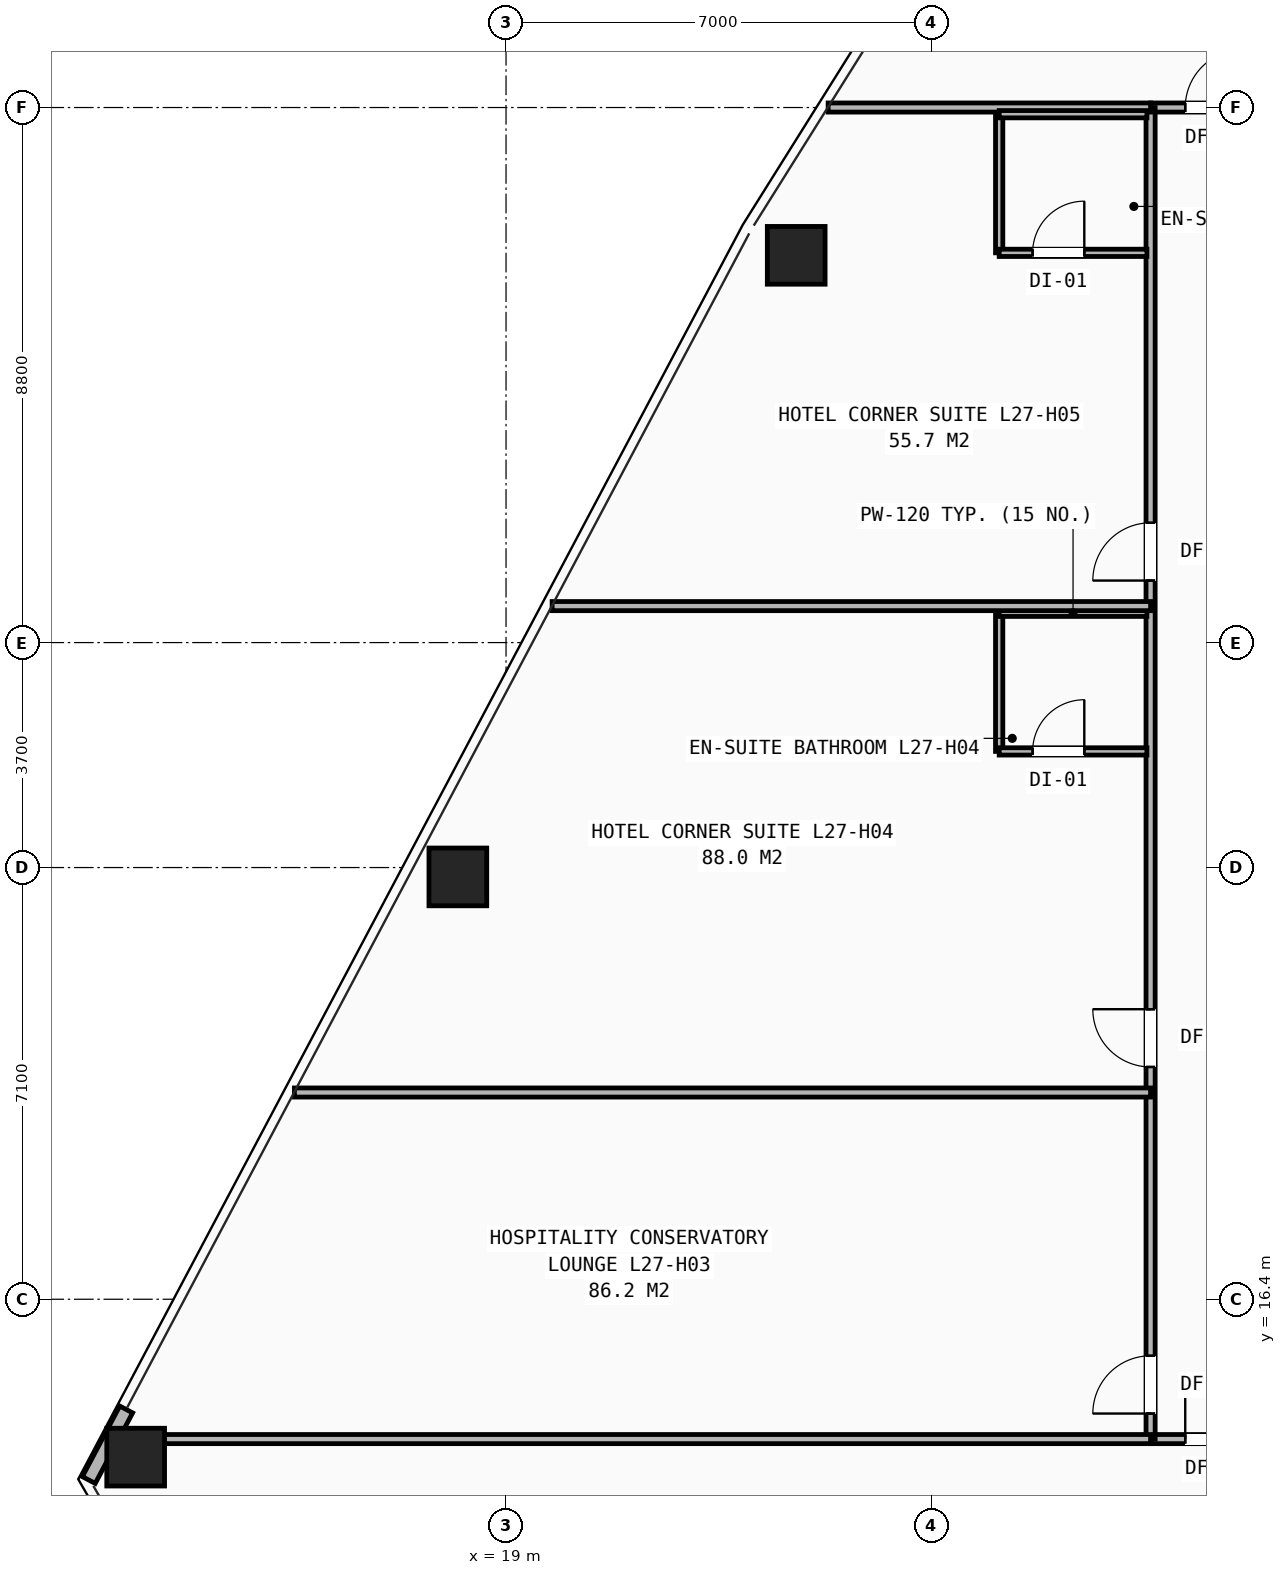
"""IFC4 building model, lengths in metres.
Left out: names, types, materials, properties, quantities, classifications, styles, units other than length and angle.
Written with IfcOpenShell. Run it as: python <this file> out.ifc"""

import sys

from ifc_helpers import new_model, si_unit, direction, frame, frame_2d, origin, origin_2d, place, context, subcontext, project, spatial, rectangle, hollow_rectangle, extrude, element, fill, save


model = new_model("IFC4")
c1 = context("Model", 3, precision=1e-05, world=origin(), true_north=direction((0.0, 1.0)))
c2 = subcontext(c1, "Body", "Model", "MODEL_VIEW")
j1 = project(units=[si_unit("LENGTHUNIT", "METRE"), si_unit("PLANEANGLEUNIT", "RADIAN")], contexts=[c1])
p1 = place(None, origin())
s1 = spatial("IfcSite", under=j1, at=p1, CompositionType="ELEMENT")
p2 = place(p1, origin())
s2 = spatial("IfcBuilding", under=s1, at=p2, CompositionType="ELEMENT")
p3 = place(p2, frame((0.0, 0.0, 95.8)))
s3 = spatial("IfcBuildingStorey", under=s2, at=p3, CompositionType="ELEMENT", Elevation=95.8)
for number, where, z_axis, x_axis in (
    (1, (23.772, 33.569, 0.0), (0.0, 0.0, 1.0), (1.0, 0.0, 0.0)),
    (2, (18.208, 23.346, 0.0), (0.0, 0.0, 1.0), (1.0, 0.0, 0.0)),
    (3, (12.909, 13.803, 0.0), (0.0, 0.0, 1.0), (1.0, 0.0, 0.0)),
):
    element("IfcColumn", number, at=place(p3, frame(where, z_axis=z_axis, x_axis=x_axis)), inside=s3, PredefinedType="COLUMN", context=c2, shape_type="SweptSolid", body=[
        extrude(hollow_rectangle(XDim=0.95, YDim=0.95, WallThickness=0.065, at=origin_2d()), origin(), (0.0, 0.0, 1.0), 3.2),
    ])
p4 = place(p3, frame((12.753, 14.587, 0.0), z_axis=(0.0, 0.0, 1.0), x_axis=(-0.468058524958, -0.883697469281, 0.0)))
e4 = element("IfcWall", 4, at=p4, inside=s3, PredefinedType="SHEAR", context=c2, shape_type="SweptSolid", body=[
    extrude(rectangle(XDim=1.313, YDim=0.24, at=frame_2d((0.657, 0.0))), origin(), (0.0, 0.0, 1.0), 2.253),
])
p5 = place(p3, frame((29.6, 14.1, 0.0), z_axis=(0.0, 0.0, 1.0), x_axis=(1.0, 0.0, 0.0)))
e5 = element("IfcWall", 5, at=p5, inside=s3, PredefinedType="PARTITIONING", context=c2, shape_type="SweptSolid", body=[
    extrude(rectangle(XDim=20.8, YDim=0.15, at=frame_2d((10.4, 0.0))), origin(), (0.0, 0.0, 1.0), 2.421),
])
p6 = place(p5, frame((0.57, 0.0, 0.0)))
e6 = element("IfcOpeningElement", 6, at=p6, cuts=e5, PredefinedType="OPENING", context=c2, shape_type="SweptSolid", body=[
    extrude(rectangle(XDim=0.95, YDim=2.1, at=frame_2d((0.475, 1.05))), frame((0.0, 0.085, 0.0), z_axis=(0.0, -1.0, 0.0), x_axis=(1.0, 0.0, 0.0)), (0.0, 0.0, 1.0), 0.17),
])
p7 = place(p5, frame((14.02, 0.0, 0.0)))
e7 = element("IfcOpeningElement", 7, at=p7, cuts=e5, PredefinedType="OPENING", context=c2, shape_type="SweptSolid", body=[
    extrude(rectangle(XDim=0.95, YDim=2.1, at=frame_2d((0.475, 1.05))), frame((0.0, 0.085, 0.0), z_axis=(0.0, -1.0, 0.0), x_axis=(1.0, 0.0, 0.0)), (0.0, 0.0, 1.0), 0.17),
])
p8 = place(p3, frame((29.6, 36.0, 0.0), z_axis=(0.0, 0.0, 1.0), x_axis=(1.0, 0.0, 0.0)))
e8 = element("IfcWall", 8, at=p8, inside=s3, PredefinedType="PARTITIONING", context=c2, shape_type="SweptSolid", body=[
    extrude(rectangle(XDim=9.65, YDim=0.15, at=frame_2d((4.825, 0.0))), origin(), (0.0, 0.0, 1.0), 2.503),
])
p9 = place(p8, frame((0.57, 0.0, 0.0)))
e9 = element("IfcOpeningElement", 9, at=p9, cuts=e8, PredefinedType="OPENING", context=c2, shape_type="SweptSolid", body=[
    extrude(rectangle(XDim=0.95, YDim=2.1, at=frame_2d((0.475, 1.05))), frame((0.0, 0.085, 0.0), z_axis=(0.0, -1.0, 0.0), x_axis=(1.0, 0.0, 0.0)), (0.0, 0.0, 1.0), 0.17),
])
p10 = place(p8, frame((8.02, 0.0, 0.0)))
e10 = element("IfcOpeningElement", 10, at=p10, cuts=e8, PredefinedType="OPENING", context=c2, shape_type="SweptSolid", body=[
    extrude(rectangle(XDim=0.95, YDim=2.1, at=frame_2d((0.475, 1.05))), frame((0.0, 0.085, 0.0), z_axis=(0.0, -1.0, 0.0), x_axis=(1.0, 0.0, 0.0)), (0.0, 0.0, 1.0), 0.17),
])
p11 = place(p3, frame((29.6, 14.1, 0.0), z_axis=(0.0, 0.0, 1.0), x_axis=(0.0, 1.0, 0.0)))
e11 = element("IfcWall", 11, at=p11, inside=s3, PredefinedType="PARTITIONING", context=c2, shape_type="SweptSolid", body=[
    extrude(rectangle(XDim=21.9, YDim=0.15, at=frame_2d((10.95, 0.0))), origin(), (0.0, 0.0, 1.0), 2.421),
])
p12 = place(p11, frame((0.42, 0.0, 0.0)))
e12 = element("IfcOpeningElement", 12, at=p12, cuts=e11, PredefinedType="OPENING", context=c2, shape_type="SweptSolid", body=[
    extrude(rectangle(XDim=0.95, YDim=2.1, at=frame_2d((0.475, 1.05))), frame((0.0, 0.085, 0.0), z_axis=(0.0, -1.0, 0.0), x_axis=(1.0, 0.0, 0.0)), (0.0, 0.0, 1.0), 0.17),
])
p13 = place(p11, frame((6.12, 0.0, 0.0)))
e13 = element("IfcOpeningElement", 13, at=p13, cuts=e11, PredefinedType="OPENING", context=c2, shape_type="SweptSolid", body=[
    extrude(rectangle(XDim=0.95, YDim=2.1, at=frame_2d((0.475, 1.05))), frame((0.0, 0.085, 0.0), z_axis=(0.0, -1.0, 0.0), x_axis=(1.0, 0.0, 0.0)), (0.0, 0.0, 1.0), 0.17),
])
p14 = place(p11, frame((14.12, 0.0, 0.0)))
e14 = element("IfcOpeningElement", 14, at=p14, cuts=e11, PredefinedType="OPENING", context=c2, shape_type="SweptSolid", body=[
    extrude(rectangle(XDim=0.95, YDim=2.1, at=frame_2d((0.475, 1.05))), frame((0.0, 0.085, 0.0), z_axis=(0.0, -1.0, 0.0), x_axis=(1.0, 0.0, 0.0)), (0.0, 0.0, 1.0), 0.17),
])
p15 = place(p3, frame((12.5, 14.1, 0.0), z_axis=(0.0, 0.0, 1.0), x_axis=(1.0, 0.0, 0.0)))
e15 = element("IfcWall", 15, at=p15, inside=s3, PredefinedType="PARTITIONING", context=c2, shape_type="SweptSolid", body=[
    extrude(rectangle(XDim=17.1, YDim=0.15, at=frame_2d((8.55, 0.0))), origin(), (0.0, 0.0, 1.0), 2.258),
])
p16 = place(p3, frame((24.297, 36.0, 0.0), z_axis=(0.0, 0.0, 1.0), x_axis=(1.0, 0.0, 0.0)))
e16 = element("IfcWall", 16, at=p16, inside=s3, PredefinedType="PARTITIONING", context=c2, shape_type="SweptSolid", body=[
    extrude(rectangle(XDim=5.303, YDim=0.15, at=frame_2d((2.651, 0.0))), origin(), (0.0, 0.0, 1.0), 2.258),
])
p17 = place(p3, frame((15.52, 19.8, 0.0), z_axis=(0.0, 0.0, 1.0), x_axis=(1.0, 0.0, 0.0)))
e17 = element("IfcWall", 17, at=p17, inside=s3, PredefinedType="PARTITIONING", context=c2, shape_type="SweptSolid", body=[
    extrude(rectangle(XDim=14.08, YDim=0.15, at=frame_2d((7.04, 0.0))), origin(), (0.0, 0.0, 1.0), 2.258),
])
p18 = place(p3, frame((27.11, 25.41, 0.0), z_axis=(0.0, 0.0, 1.0), x_axis=(0.0, 1.0, 0.0)))
e18 = element("IfcWall", 18, at=p18, inside=s3, PredefinedType="PARTITIONING", context=c2, shape_type="SweptSolid", body=[
    extrude(rectangle(XDim=2.28, YDim=0.12, at=frame_2d((1.14, 0.0))), origin(), (0.0, 0.0, 1.0), 2.97),
])
p19 = place(p3, frame((27.11, 25.41, 0.0), z_axis=(0.0, 0.0, 1.0), x_axis=(1.0, 0.0, 0.0)))
e19 = element("IfcWall", 19, at=p19, inside=s3, PredefinedType="PARTITIONING", context=c2, shape_type="SweptSolid", body=[
    extrude(rectangle(XDim=2.43, YDim=0.12, at=frame_2d((1.215, 0.0))), origin(), (0.0, 0.0, 1.0), 2.97),
])
p20 = place(p19, frame((0.55, 0.0, 0.0)))
e20 = element("IfcOpeningElement", 20, at=p20, cuts=e19, PredefinedType="OPENING", context=c2, shape_type="SweptSolid", body=[
    extrude(rectangle(XDim=0.85, YDim=2.05, at=frame_2d((0.425, 1.025))), frame((0.0, 0.07, 0.0), z_axis=(0.0, -1.0, 0.0), x_axis=(1.0, 0.0, 0.0)), (0.0, 0.0, 1.0), 0.14),
])
p21 = place(p3, frame((27.11, 27.69, 0.0), z_axis=(0.0, 0.0, 1.0), x_axis=(1.0, 0.0, 0.0)))
e21 = element("IfcWall", 21, at=p21, inside=s3, PredefinedType="PARTITIONING", context=c2, shape_type="SweptSolid", body=[
    extrude(rectangle(XDim=2.43, YDim=0.12, at=frame_2d((1.215, 0.0))), origin(), (0.0, 0.0, 1.0), 2.97),
])
p22 = place(p3, frame((19.758, 27.8, 0.0), z_axis=(0.0, 0.0, 1.0), x_axis=(1.0, 0.0, 0.0)))
e22 = element("IfcWall", 22, at=p22, inside=s3, PredefinedType="PARTITIONING", context=c2, shape_type="SweptSolid", body=[
    extrude(rectangle(XDim=9.842, YDim=0.15, at=frame_2d((4.921, 0.0))), origin(), (0.0, 0.0, 1.0), 2.258),
])
p23 = place(p3, frame((27.11, 33.61, 0.0), z_axis=(0.0, 0.0, 1.0), x_axis=(0.0, 1.0, 0.0)))
e23 = element("IfcWall", 23, at=p23, inside=s3, PredefinedType="PARTITIONING", context=c2, shape_type="SweptSolid", body=[
    extrude(rectangle(XDim=2.28, YDim=0.12, at=frame_2d((1.14, 0.0))), origin(), (0.0, 0.0, 1.0), 2.97),
])
p24 = place(p3, frame((27.11, 33.61, 0.0), z_axis=(0.0, 0.0, 1.0), x_axis=(1.0, 0.0, 0.0)))
e24 = element("IfcWall", 24, at=p24, inside=s3, PredefinedType="PARTITIONING", context=c2, shape_type="SweptSolid", body=[
    extrude(rectangle(XDim=2.43, YDim=0.12, at=frame_2d((1.215, 0.0))), origin(), (0.0, 0.0, 1.0), 2.503),
])
p25 = place(p24, frame((0.55, 0.0, 0.0)))
e25 = element("IfcOpeningElement", 25, at=p25, cuts=e24, PredefinedType="OPENING", context=c2, shape_type="SweptSolid", body=[
    extrude(rectangle(XDim=0.85, YDim=2.05, at=frame_2d((0.425, 1.025))), frame((0.0, 0.07, 0.0), z_axis=(0.0, -1.0, 0.0), x_axis=(1.0, 0.0, 0.0)), (0.0, 0.0, 1.0), 0.14),
])
p26 = place(p3, frame((27.11, 35.89, 0.0), z_axis=(0.0, 0.0, 1.0), x_axis=(1.0, 0.0, 0.0)))
e26 = element("IfcWall", 26, at=p26, inside=s3, PredefinedType="PARTITIONING", context=c2, shape_type="SweptSolid", body=[
    extrude(rectangle(XDim=2.43, YDim=0.12, at=frame_2d((1.215, 0.0))), origin(), (0.0, 0.0, 1.0), 2.503),
])
p27 = place(p6, origin())
e27 = element("IfcDoor", 27, at=p27, inside=s3, OperationType="SINGLE_SWING_LEFT", PredefinedType="DOOR", context=c2, shape_type="SweptSolid", body=[
    extrude(rectangle(XDim=0.95, YDim=2.1, at=frame_2d((0.475, 1.05))), frame((0.0, 0.025, 0.0), z_axis=(0.0, -1.0, 0.0), x_axis=(1.0, 0.0, 0.0)), (0.0, 0.0, 1.0), 0.05),
])
fill(e6, e27)
p28 = place(p12, origin())
e28 = element("IfcDoor", 28, at=p28, inside=s3, OperationType="SINGLE_SWING_LEFT", PredefinedType="DOOR", context=c2, shape_type="SweptSolid", body=[
    extrude(rectangle(XDim=0.95, YDim=2.1, at=frame_2d((0.475, 1.05))), frame((0.0, 0.025, 0.0), z_axis=(0.0, -1.0, 0.0), x_axis=(1.0, 0.0, 0.0)), (0.0, 0.0, 1.0), 0.05),
])
fill(e12, e28)
p29 = place(p13, origin())
e29 = element("IfcDoor", 29, at=p29, inside=s3, OperationType="SINGLE_SWING_RIGHT", PredefinedType="DOOR", context=c2, shape_type="SweptSolid", body=[
    extrude(rectangle(XDim=0.95, YDim=2.1, at=frame_2d((0.475, 1.05))), frame((0.0, 0.025, 0.0), z_axis=(0.0, -1.0, 0.0), x_axis=(1.0, 0.0, 0.0)), (0.0, 0.0, 1.0), 0.05),
])
fill(e13, e29)
p30 = place(p20, origin())
e30 = element("IfcDoor", 30, at=p30, inside=s3, OperationType="SINGLE_SWING_RIGHT", PredefinedType="DOOR", context=c2, shape_type="SweptSolid", body=[
    extrude(rectangle(XDim=0.85, YDim=2.05, at=frame_2d((0.425, 1.025))), frame((0.0, 0.025, 0.0), z_axis=(0.0, -1.0, 0.0), x_axis=(1.0, 0.0, 0.0)), (0.0, 0.0, 1.0), 0.05),
])
fill(e20, e30)
p31 = place(p14, origin())
e31 = element("IfcDoor", 31, at=p31, inside=s3, OperationType="SINGLE_SWING_LEFT", PredefinedType="DOOR", context=c2, shape_type="SweptSolid", body=[
    extrude(rectangle(XDim=0.95, YDim=2.1, at=frame_2d((0.475, 1.05))), frame((0.0, 0.025, 0.0), z_axis=(0.0, -1.0, 0.0), x_axis=(1.0, 0.0, 0.0)), (0.0, 0.0, 1.0), 0.05),
])
fill(e14, e31)
p32 = place(p25, origin())
e32 = element("IfcDoor", 32, at=p32, inside=s3, OperationType="SINGLE_SWING_RIGHT", PredefinedType="DOOR", context=c2, shape_type="SweptSolid", body=[
    extrude(rectangle(XDim=0.85, YDim=2.05, at=frame_2d((0.425, 1.025))), frame((0.0, 0.025, 0.0), z_axis=(0.0, -1.0, 0.0), x_axis=(1.0, 0.0, 0.0)), (0.0, 0.0, 1.0), 0.05),
])
fill(e25, e32)
p33 = place(p9, origin())
e33 = element("IfcDoor", 33, at=p33, inside=s3, OperationType="SINGLE_SWING_RIGHT", PredefinedType="DOOR", context=c2, shape_type="SweptSolid", body=[
    extrude(rectangle(XDim=0.95, YDim=2.1, at=frame_2d((0.475, 1.05))), frame((0.0, 0.025, 0.0), z_axis=(0.0, -1.0, 0.0), x_axis=(1.0, 0.0, 0.0)), (0.0, 0.0, 1.0), 0.05),
])
fill(e9, e33)
save(model, sys.argv[1])
